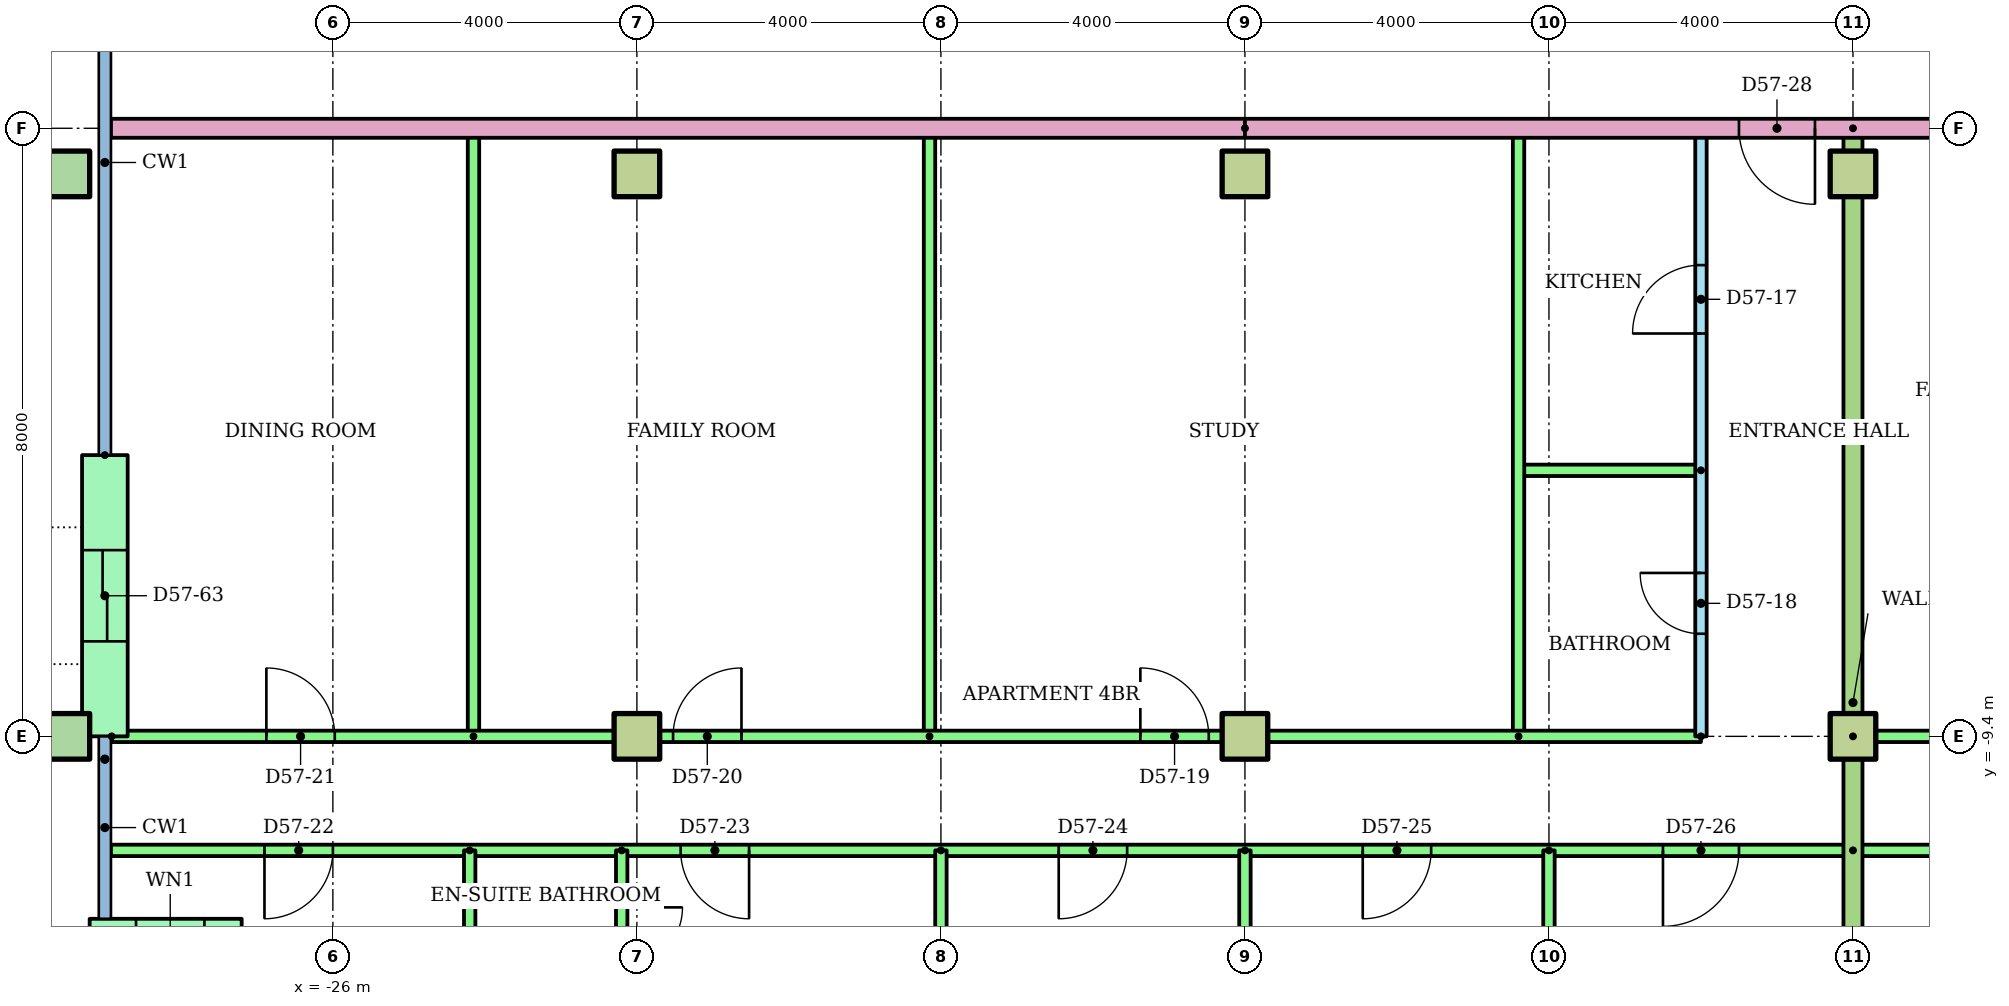
"""IFC4 building model, lengths in metres.
Left out: names, types, materials, properties, quantities, classifications, styles, units other than length and angle.
Written with IfcOpenShell. Run it as: python <this file> out.ifc"""

import sys

from ifc_helpers import new_model, si_unit, direction, frame, frame_2d, origin, origin_2d, place, context, subcontext, project, spatial, rectangle, hollow_rectangle, extrude, element, fill, save


model = new_model("IFC4")
c1 = context("Model", 3, precision=1e-05, world=origin(), true_north=direction((0.0, 1.0)))
c2 = subcontext(c1, "Body", "Model", "MODEL_VIEW")
j1 = project(units=[si_unit("LENGTHUNIT", "METRE"), si_unit("PLANEANGLEUNIT", "RADIAN")], contexts=[c1])
p1 = place(None, origin())
s1 = spatial("IfcSite", under=j1, at=p1, CompositionType="ELEMENT")
p2 = place(p1, origin())
s2 = spatial("IfcBuilding", under=s1, at=p2, CompositionType="ELEMENT")
p3 = place(p2, frame((0.0, 0.0, 220.4)))
s3 = spatial("IfcBuildingStorey", under=s2, at=p3, CompositionType="ELEMENT", Elevation=220.4)
p4 = place(p3, frame((-29.5, -9.4, 0.0)))
e1 = element("IfcColumn", 1, at=p4, inside=s3, PredefinedType="COLUMN", context=c2, shape_type="SweptSolid", body=[
    extrude(hollow_rectangle(XDim=0.6, YDim=0.6, WallThickness=0.03, at=origin_2d()), origin(), (0.0, 0.0, 1.0), 3.2),
])
for number, where in (
    (2, (-22.0, -9.4, 0.0)),
    (3, (-14.0, -9.4, 0.0)),
    (4, (-6.0, -9.4, 0.0)),
):
    element("IfcColumn", number, at=place(p3, frame(where)), inside=s3, PredefinedType="COLUMN", context=c2, shape_type="SweptSolid", body=[
        extrude(rectangle(XDim=0.6, YDim=0.6, at=origin_2d()), origin(), (0.0, 0.0, 1.0), 3.2),
    ])
p5 = place(p3, frame((-29.5, -2.0, 0.0)))
e5 = element("IfcColumn", 5, at=p5, inside=s3, PredefinedType="COLUMN", context=c2, shape_type="SweptSolid", body=[
    extrude(hollow_rectangle(XDim=0.6, YDim=0.6, WallThickness=0.03, at=origin_2d()), origin(), (0.0, 0.0, 1.0), 3.2),
])
for number, where in (
    (6, (-22.0, -2.0, 0.0)),
    (7, (-14.0, -2.0, 0.0)),
    (8, (-6.0, -2.0, 0.0)),
):
    element("IfcColumn", number, at=place(p3, frame(where)), inside=s3, PredefinedType="COLUMN", context=c2, shape_type="SweptSolid", body=[
        extrude(rectangle(XDim=0.6, YDim=0.6, at=origin_2d()), origin(), (0.0, 0.0, 1.0), 3.2),
    ])
p6 = place(p3, frame((-29.0, -5.7, 0.0), z_axis=(0.0, 0.0, 1.0), x_axis=(0.0, -1.0, 0.0)))
e9 = element("IfcWall", 9, at=p6, inside=s3, PredefinedType="STANDARD", context=c2, shape_type="SweptSolid", body=[
    extrude(rectangle(XDim=3.7, YDim=0.6, at=frame_2d((1.85, 0.0))), origin(), (0.0, 0.0, 1.0), 2.92),
])
p7 = place(p6, frame((1.25, 0.0, 0.0)))
e10 = element("IfcOpeningElement", 10, at=p7, cuts=e9, PredefinedType="OPENING", context=c2, shape_type="SweptSolid", body=[
    extrude(rectangle(XDim=1.2, YDim=2.1, at=frame_2d((0.6, 1.05))), frame((0.0, 0.31, 0.0), z_axis=(0.0, -1.0, 0.0), x_axis=(1.0, 0.0, 0.0)), (0.0, 0.0, 1.0), 0.62),
])
p8 = place(p3, frame((-29.2, -12.1, 0.0)))
e11 = element("IfcWall", 11, at=p8, inside=s3, PredefinedType="STANDARD", context=c2, shape_type="SweptSolid", body=[
    extrude(rectangle(XDim=2.0, YDim=0.6, at=frame_2d((1.0, 0.0))), origin(), (0.0, 0.0, 1.0), 2.92),
])
p9 = place(p8, frame((0.61, 0.0, 0.9)))
e12 = element("IfcOpeningElement", 12, at=p9, cuts=e11, PredefinedType="OPENING", context=c2, shape_type="SweptSolid", body=[
    extrude(rectangle(XDim=0.9, YDim=1.5, at=frame_2d((0.45, 0.75))), frame((0.0, 0.31, 0.0), z_axis=(0.0, -1.0, 0.0), x_axis=(1.0, 0.0, 0.0)), (0.0, 0.0, 1.0), 0.62),
])
p10 = place(p3, frame((-8.0, -9.4, 0.0), z_axis=(0.0, 0.0, 1.0), x_axis=(0.0, 1.0, 0.0)))
e13 = element("IfcWall", 13, at=p10, inside=s3, PredefinedType="PARTITIONING", context=c2, shape_type="SweptSolid", body=[
    extrude(rectangle(XDim=8.0, YDim=0.15, at=frame_2d((4.0, 0.0))), origin(), (0.0, 0.0, 1.0), 2.4),
])
p11 = place(p10, frame((5.3, 0.0, 0.0)))
e14 = element("IfcOpeningElement", 14, at=p11, cuts=e13, PredefinedType="OPENING", context=c2, shape_type="SweptSolid", body=[
    extrude(rectangle(XDim=0.9, YDim=2.1, at=frame_2d((0.45, 1.05))), frame((0.0, 0.085, 0.0), z_axis=(0.0, -1.0, 0.0), x_axis=(1.0, 0.0, 0.0)), (0.0, 0.0, 1.0), 0.17),
])
p12 = place(p10, frame((1.35, 0.0, 0.0)))
e15 = element("IfcOpeningElement", 15, at=p12, cuts=e13, PredefinedType="OPENING", context=c2, shape_type="SweptSolid", body=[
    extrude(rectangle(XDim=0.8, YDim=2.1, at=frame_2d((0.4, 1.05))), frame((0.0, 0.085, 0.0), z_axis=(0.0, -1.0, 0.0), x_axis=(1.0, 0.0, 0.0)), (0.0, 0.0, 1.0), 0.17),
])
p13 = place(p3, frame((-8.0, -5.9, 0.0), z_axis=(0.0, 0.0, 1.0), x_axis=(-1.0, 0.0, 0.0)))
e16 = element("IfcWall", 16, at=p13, inside=s3, PredefinedType="PARTITIONING", context=c2, shape_type="SweptSolid", body=[
    extrude(rectangle(XDim=2.4, YDim=0.15, at=frame_2d((1.2, 0.0))), origin(), (0.0, 0.0, 1.0), 2.4),
])
for number, where, z_axis, x_axis in (
    (17, (-10.4, -9.4, 0.0), (0.0, 0.0, 1.0), (0.0, 1.0, 0.0)),
    (18, (-18.15, -9.4, 0.0), (0.0, 0.0, 1.0), (0.0, 1.0, 0.0)),
    (19, (-24.15, -9.4, 0.0), (0.0, 0.0, 1.0), (0.0, 1.0, 0.0)),
):
    element("IfcWall", number, at=place(p3, frame(where, z_axis=z_axis, x_axis=x_axis)), inside=s3, PredefinedType="PARTITIONING", context=c2, shape_type="SweptSolid", body=[
        extrude(rectangle(XDim=8.0, YDim=0.15, at=frame_2d((4.0, 0.0))), origin(), (0.0, 0.0, 1.0), 2.4),
    ])
p14 = place(p3, frame((-28.91, -9.4, 0.0)))
e20 = element("IfcWall", 20, at=p14, inside=s3, PredefinedType="PARTITIONING", context=c2, shape_type="SweptSolid", body=[
    extrude(rectangle(XDim=20.91, YDim=0.15, at=frame_2d((10.455, 0.0))), origin(), (0.0, 0.0, 1.0), 2.4),
])
p15 = place(p14, frame((13.534, 0.0, 0.0)))
e21 = element("IfcOpeningElement", 21, at=p15, cuts=e20, PredefinedType="OPENING", context=c2, shape_type="SweptSolid", body=[
    extrude(rectangle(XDim=0.9, YDim=2.1, at=frame_2d((0.45, 1.05))), frame((0.0, 0.085, 0.0), z_axis=(0.0, -1.0, 0.0), x_axis=(1.0, 0.0, 0.0)), (0.0, 0.0, 1.0), 0.17),
])
p16 = place(p14, frame((7.386, 0.0, 0.0)))
e22 = element("IfcOpeningElement", 22, at=p16, cuts=e20, PredefinedType="OPENING", context=c2, shape_type="SweptSolid", body=[
    extrude(rectangle(XDim=0.9, YDim=2.1, at=frame_2d((0.45, 1.05))), frame((0.0, 0.085, 0.0), z_axis=(0.0, -1.0, 0.0), x_axis=(1.0, 0.0, 0.0)), (0.0, 0.0, 1.0), 0.17),
])
p17 = place(p14, frame((2.035, 0.0, 0.0)))
e23 = element("IfcOpeningElement", 23, at=p17, cuts=e20, PredefinedType="OPENING", context=c2, shape_type="SweptSolid", body=[
    extrude(rectangle(XDim=0.9, YDim=2.1, at=frame_2d((0.45, 1.05))), frame((0.0, 0.085, 0.0), z_axis=(0.0, -1.0, 0.0), x_axis=(1.0, 0.0, 0.0)), (0.0, 0.0, 1.0), 0.17),
])
p18 = place(p3, frame((-6.0, -10.9, 0.0), z_axis=(0.0, 0.0, 1.0), x_axis=(-1.0, 0.0, 0.0)))
e24 = element("IfcWall", 24, at=p18, inside=s3, PredefinedType="PARTITIONING", context=c2, shape_type="SweptSolid", body=[
    extrude(rectangle(XDim=22.92, YDim=0.15, at=frame_2d((11.46, 0.0))), origin(), (0.0, 0.0, 1.0), 2.4),
])
p19 = place(p18, frame((20.0, 0.0, 0.0)))
e25 = element("IfcOpeningElement", 25, at=p19, cuts=e24, PredefinedType="OPENING", context=c2, shape_type="SweptSolid", body=[
    extrude(rectangle(XDim=0.9, YDim=2.1, at=frame_2d((0.45, 1.05))), frame((0.0, 0.085, 0.0), z_axis=(0.0, -1.0, 0.0), x_axis=(1.0, 0.0, 0.0)), (0.0, 0.0, 1.0), 0.17),
])
p20 = place(p18, frame((14.524, 0.0, 0.0)))
e26 = element("IfcOpeningElement", 26, at=p20, cuts=e24, PredefinedType="OPENING", context=c2, shape_type="SweptSolid", body=[
    extrude(rectangle(XDim=0.9, YDim=2.1, at=frame_2d((0.45, 1.05))), frame((0.0, 0.085, 0.0), z_axis=(0.0, -1.0, 0.0), x_axis=(1.0, 0.0, 0.0)), (0.0, 0.0, 1.0), 0.17),
])
p21 = place(p18, frame((9.55, 0.0, 0.0)))
e27 = element("IfcOpeningElement", 27, at=p21, cuts=e24, PredefinedType="OPENING", context=c2, shape_type="SweptSolid", body=[
    extrude(rectangle(XDim=0.9, YDim=2.1, at=frame_2d((0.45, 1.05))), frame((0.0, 0.085, 0.0), z_axis=(0.0, -1.0, 0.0), x_axis=(1.0, 0.0, 0.0)), (0.0, 0.0, 1.0), 0.17),
])
p22 = place(p18, frame((5.55, 0.0, 0.0)))
e28 = element("IfcOpeningElement", 28, at=p22, cuts=e24, PredefinedType="OPENING", context=c2, shape_type="SweptSolid", body=[
    extrude(rectangle(XDim=0.9, YDim=2.1, at=frame_2d((0.45, 1.05))), frame((0.0, 0.085, 0.0), z_axis=(0.0, -1.0, 0.0), x_axis=(1.0, 0.0, 0.0)), (0.0, 0.0, 1.0), 0.17),
])
p23 = place(p18, frame((1.5, 0.0, 0.0)))
e29 = element("IfcOpeningElement", 29, at=p23, cuts=e24, PredefinedType="OPENING", context=c2, shape_type="SweptSolid", body=[
    extrude(rectangle(XDim=1.0, YDim=2.1, at=frame_2d((0.5, 1.05))), frame((0.0, 0.085, 0.0), z_axis=(0.0, -1.0, 0.0), x_axis=(1.0, 0.0, 0.0)), (0.0, 0.0, 1.0), 0.17),
])
p24 = place(p3, frame((-24.2, -10.9, 0.0), z_axis=(0.0, 0.0, 1.0), x_axis=(0.0, -1.0, 0.0)))
e30 = element("IfcWall", 30, at=p24, inside=s3, PredefinedType="PARTITIONING", context=c2, shape_type="SweptSolid", body=[
    extrude(rectangle(XDim=3.82, YDim=0.15, at=frame_2d((1.91, 0.0))), origin(), (0.0, 0.0, 1.0), 2.4),
])
p25 = place(p3, frame((-18.0, -10.9, 0.0), z_axis=(0.0, 0.0, 1.0), x_axis=(0.0, -1.0, 0.0)))
e31 = element("IfcWall", 31, at=p25, inside=s3, PredefinedType="PARTITIONING", context=c2, shape_type="SweptSolid", body=[
    extrude(rectangle(XDim=5.621, YDim=0.15, at=frame_2d((2.811, 0.0))), origin(), (0.0, 0.0, 1.0), 2.4),
])
p26 = place(p3, frame((-14.0, -10.9, 0.0), z_axis=(0.0, 0.0, 1.0), x_axis=(0.0, -1.0, 0.0)))
e32 = element("IfcWall", 32, at=p26, inside=s3, PredefinedType="PARTITIONING", context=c2, shape_type="SweptSolid", body=[
    extrude(rectangle(XDim=5.61, YDim=0.15, at=frame_2d((2.805, 0.0))), origin(), (0.0, 0.0, 1.0), 2.4),
])
p27 = place(p3, frame((-10.0, -10.9, 0.0), z_axis=(0.0, 0.0, 1.0), x_axis=(0.0, -1.0, 0.0)))
e33 = element("IfcWall", 33, at=p27, inside=s3, PredefinedType="PARTITIONING", context=c2, shape_type="SweptSolid", body=[
    extrude(rectangle(XDim=5.621, YDim=0.15, at=frame_2d((2.811, 0.0))), origin(), (0.0, 0.0, 1.0), 2.4),
])
p28 = place(p3, frame((-22.2, -10.9, 0.0), z_axis=(0.0, 0.0, 1.0), x_axis=(0.0, -1.0, 0.0)))
e34 = element("IfcWall", 34, at=p28, inside=s3, PredefinedType="PARTITIONING", context=c2, shape_type="SweptSolid", body=[
    extrude(rectangle(XDim=2.3, YDim=0.15, at=frame_2d((1.15, 0.0))), origin(), (0.0, 0.0, 1.0), 2.4),
])
p29 = place(p28, frame((0.75, 0.0, 0.0)))
e35 = element("IfcOpeningElement", 35, at=p29, cuts=e34, PredefinedType="OPENING", context=c2, shape_type="SweptSolid", body=[
    extrude(rectangle(XDim=0.8, YDim=2.1, at=frame_2d((0.4, 1.05))), frame((0.0, 0.085, 0.0), z_axis=(0.0, -1.0, 0.0), x_axis=(1.0, 0.0, 0.0)), (0.0, 0.0, 1.0), 0.17),
])
p30 = place(p3, frame((-6.0, -9.4, 0.0)))
e36 = element("IfcWall", 36, at=p30, inside=s3, PredefinedType="PARTITIONING", context=c2, shape_type="SweptSolid", body=[
    extrude(rectangle(XDim=6.0, YDim=0.15, at=frame_2d((3.0, 0.0))), origin(), (0.0, 0.0, 1.0), 2.4),
])
p31 = place(p30, frame((1.35, 0.0, 0.0)))
e37 = element("IfcOpeningElement", 37, at=p31, cuts=e36, PredefinedType="OPENING", context=c2, shape_type="SweptSolid", body=[
    extrude(rectangle(XDim=0.9, YDim=2.1, at=frame_2d((0.45, 1.05))), frame((0.0, 0.085, 0.0), z_axis=(0.0, -1.0, 0.0), x_axis=(1.0, 0.0, 0.0)), (0.0, 0.0, 1.0), 0.17),
])
p32 = place(p3, frame((2.0, -10.9, 0.0), z_axis=(0.0, 0.0, 1.0), x_axis=(-1.0, 0.0, 0.0)))
e38 = element("IfcWall", 38, at=p32, inside=s3, PredefinedType="PARTITIONING", context=c2, shape_type="SweptSolid", body=[
    extrude(rectangle(XDim=8.0, YDim=0.15, at=frame_2d((4.0, 0.0))), origin(), (0.0, 0.0, 1.0), 2.4),
])
p33 = place(p32, frame((5.55, 0.0, 0.0)))
e39 = element("IfcOpeningElement", 39, at=p33, cuts=e38, PredefinedType="OPENING", context=c2, shape_type="SweptSolid", body=[
    extrude(rectangle(XDim=0.9, YDim=2.1, at=frame_2d((0.45, 1.05))), frame((0.0, 0.085, 0.0), z_axis=(0.0, -1.0, 0.0), x_axis=(1.0, 0.0, 0.0)), (0.0, 0.0, 1.0), 0.17),
])
p34 = place(p32, frame((1.5, 0.0, 0.0)))
e40 = element("IfcOpeningElement", 40, at=p34, cuts=e38, PredefinedType="OPENING", context=c2, shape_type="SweptSolid", body=[
    extrude(rectangle(XDim=1.0, YDim=2.1, at=frame_2d((0.5, 1.05))), frame((0.0, 0.085, 0.0), z_axis=(0.0, -1.0, 0.0), x_axis=(1.0, 0.0, 0.0)), (0.0, 0.0, 1.0), 0.17),
])
p35 = place(p3, frame((-6.0, -1.4, 0.0), z_axis=(0.0, 0.0, 1.0), x_axis=(0.0, -1.0, 0.0)))
e41 = element("IfcWall", 41, at=p35, inside=s3, PredefinedType="PARTITIONING", context=c2, shape_type="SweptSolid", body=[
    extrude(rectangle(XDim=15.11, YDim=0.25, at=frame_2d((7.555, 0.0))), origin(), (0.0, 0.0, 1.0), 2.4),
])
p36 = place(p3, frame((-14.0, -1.4, 0.0), z_axis=(0.0, 0.0, 1.0), x_axis=(-1.0, 0.0, 0.0)))
e42 = element("IfcWall", 42, at=p36, inside=s3, PredefinedType="PARTITIONING", context=c2, shape_type="SweptSolid", body=[
    extrude(rectangle(XDim=14.92, YDim=0.25, at=frame_2d((7.46, 0.0))), origin(), (0.0, 0.0, 1.0), 2.4),
])
p37 = place(p3, frame((14.0, -1.4, 0.0), z_axis=(0.0, 0.0, 1.0), x_axis=(-1.0, 0.0, 0.0)))
e43 = element("IfcWall", 43, at=p37, inside=s3, PredefinedType="PARTITIONING", context=c2, shape_type="SweptSolid", body=[
    extrude(rectangle(XDim=28.0, YDim=0.25, at=frame_2d((14.0, 0.0))), origin(), (0.0, 0.0, 1.0), 2.4),
])
p38 = place(p37, frame((20.5, 0.0, 0.0)))
e44 = element("IfcOpeningElement", 44, at=p38, cuts=e43, PredefinedType="OPENING", context=c2, shape_type="SweptSolid", body=[
    extrude(rectangle(XDim=1.0, YDim=2.1, at=frame_2d((0.5, 1.05))), frame((0.0, 0.135, 0.0), z_axis=(0.0, -1.0, 0.0), x_axis=(1.0, 0.0, 0.0)), (0.0, 0.0, 1.0), 0.27),
])
p39 = place(p37, frame((12.5, 0.0, 0.0)))
e45 = element("IfcOpeningElement", 45, at=p39, cuts=e43, PredefinedType="OPENING", context=c2, shape_type="SweptSolid", body=[
    extrude(rectangle(XDim=1.0, YDim=2.1, at=frame_2d((0.5, 1.05))), frame((0.0, 0.135, 0.0), z_axis=(0.0, -1.0, 0.0), x_axis=(1.0, 0.0, 0.0)), (0.0, 0.0, 1.0), 0.27),
])
p40 = place(p37, frame((10.5, 0.0, 0.0)))
e46 = element("IfcOpeningElement", 46, at=p40, cuts=e43, PredefinedType="OPENING", context=c2, shape_type="SweptSolid", body=[
    extrude(rectangle(XDim=1.0, YDim=2.1, at=frame_2d((0.5, 1.05))), frame((0.0, 0.135, 0.0), z_axis=(0.0, -1.0, 0.0), x_axis=(1.0, 0.0, 0.0)), (0.0, 0.0, 1.0), 0.27),
])
p41 = place(p11, origin())
e47 = element("IfcDoor", 47, at=p41, inside=s3, OperationType="SINGLE_SWING_LEFT", PredefinedType="DOOR", context=c2, shape_type="SweptSolid", body=[
    extrude(rectangle(XDim=0.9, YDim=2.1, at=frame_2d((0.45, 1.05))), frame((0.0, 0.025, 0.0), z_axis=(0.0, -1.0, 0.0), x_axis=(1.0, 0.0, 0.0)), (0.0, 0.0, 1.0), 0.05),
])
fill(e14, e47)
p42 = place(p12, origin())
e48 = element("IfcDoor", 48, at=p42, inside=s3, OperationType="SINGLE_SWING_RIGHT", PredefinedType="DOOR", context=c2, shape_type="SweptSolid", body=[
    extrude(rectangle(XDim=0.8, YDim=2.1, at=frame_2d((0.4, 1.05))), frame((0.0, 0.025, 0.0), z_axis=(0.0, -1.0, 0.0), x_axis=(1.0, 0.0, 0.0)), (0.0, 0.0, 1.0), 0.05),
])
fill(e15, e48)
p43 = place(p15, origin())
e49 = element("IfcDoor", 49, at=p43, inside=s3, OperationType="SINGLE_SWING_LEFT", PredefinedType="DOOR", context=c2, shape_type="SweptSolid", body=[
    extrude(rectangle(XDim=0.9, YDim=2.1, at=frame_2d((0.45, 1.05))), frame((0.0, 0.025, 0.0), z_axis=(0.0, -1.0, 0.0), x_axis=(1.0, 0.0, 0.0)), (0.0, 0.0, 1.0), 0.05),
])
fill(e21, e49)
p44 = place(p16, origin())
e50 = element("IfcDoor", 50, at=p44, inside=s3, OperationType="SINGLE_SWING_RIGHT", PredefinedType="DOOR", context=c2, shape_type="SweptSolid", body=[
    extrude(rectangle(XDim=0.9, YDim=2.1, at=frame_2d((0.45, 1.05))), frame((0.0, 0.025, 0.0), z_axis=(0.0, -1.0, 0.0), x_axis=(1.0, 0.0, 0.0)), (0.0, 0.0, 1.0), 0.05),
])
fill(e22, e50)
p45 = place(p17, origin())
e51 = element("IfcDoor", 51, at=p45, inside=s3, OperationType="SINGLE_SWING_LEFT", PredefinedType="DOOR", context=c2, shape_type="SweptSolid", body=[
    extrude(rectangle(XDim=0.9, YDim=2.1, at=frame_2d((0.45, 1.05))), frame((0.0, 0.025, 0.0), z_axis=(0.0, -1.0, 0.0), x_axis=(1.0, 0.0, 0.0)), (0.0, 0.0, 1.0), 0.05),
])
fill(e23, e51)
p46 = place(p19, origin())
e52 = element("IfcDoor", 52, at=p46, inside=s3, OperationType="SINGLE_SWING_RIGHT", PredefinedType="DOOR", context=c2, shape_type="SweptSolid", body=[
    extrude(rectangle(XDim=0.9, YDim=2.1, at=frame_2d((0.45, 1.05))), frame((0.0, 0.025, 0.0), z_axis=(0.0, -1.0, 0.0), x_axis=(1.0, 0.0, 0.0)), (0.0, 0.0, 1.0), 0.05),
])
fill(e25, e52)
p47 = place(p20, origin())
e53 = element("IfcDoor", 53, at=p47, inside=s3, OperationType="SINGLE_SWING_LEFT", PredefinedType="DOOR", context=c2, shape_type="SweptSolid", body=[
    extrude(rectangle(XDim=0.9, YDim=2.1, at=frame_2d((0.45, 1.05))), frame((0.0, 0.025, 0.0), z_axis=(0.0, -1.0, 0.0), x_axis=(1.0, 0.0, 0.0)), (0.0, 0.0, 1.0), 0.05),
])
fill(e26, e53)
p48 = place(p21, origin())
e54 = element("IfcDoor", 54, at=p48, inside=s3, OperationType="SINGLE_SWING_RIGHT", PredefinedType="DOOR", context=c2, shape_type="SweptSolid", body=[
    extrude(rectangle(XDim=0.9, YDim=2.1, at=frame_2d((0.45, 1.05))), frame((0.0, 0.025, 0.0), z_axis=(0.0, -1.0, 0.0), x_axis=(1.0, 0.0, 0.0)), (0.0, 0.0, 1.0), 0.05),
])
fill(e27, e54)
p49 = place(p22, origin())
e55 = element("IfcDoor", 55, at=p49, inside=s3, OperationType="SINGLE_SWING_RIGHT", PredefinedType="DOOR", context=c2, shape_type="SweptSolid", body=[
    extrude(rectangle(XDim=0.9, YDim=2.1, at=frame_2d((0.45, 1.05))), frame((0.0, 0.025, 0.0), z_axis=(0.0, -1.0, 0.0), x_axis=(1.0, 0.0, 0.0)), (0.0, 0.0, 1.0), 0.05),
])
fill(e28, e55)
p50 = place(p23, origin())
e56 = element("IfcDoor", 56, at=p50, inside=s3, OperationType="SINGLE_SWING_RIGHT", PredefinedType="DOOR", context=c2, shape_type="SweptSolid", body=[
    extrude(rectangle(XDim=1.0, YDim=2.1, at=frame_2d((0.5, 1.05))), frame((0.0, 0.025, 0.0), z_axis=(0.0, -1.0, 0.0), x_axis=(1.0, 0.0, 0.0)), (0.0, 0.0, 1.0), 0.05),
])
fill(e29, e56)
p51 = place(p29, origin())
e57 = element("IfcDoor", 57, at=p51, inside=s3, OperationType="SINGLE_SWING_LEFT", PredefinedType="DOOR", context=c2, shape_type="SweptSolid", body=[
    extrude(rectangle(XDim=0.8, YDim=2.1, at=frame_2d((0.4, 1.05))), frame((0.0, 0.025, 0.0), z_axis=(0.0, -1.0, 0.0), x_axis=(1.0, 0.0, 0.0)), (0.0, 0.0, 1.0), 0.05),
])
fill(e35, e57)
p52 = place(p38, origin())
e58 = element("IfcDoor", 58, at=p52, inside=s3, OperationType="SINGLE_SWING_LEFT", PredefinedType="DOOR", context=c2, shape_type="SweptSolid", body=[
    extrude(rectangle(XDim=1.0, YDim=2.1, at=frame_2d((0.5, 1.05))), frame((0.0, 0.025, 0.0), z_axis=(0.0, -1.0, 0.0), x_axis=(1.0, 0.0, 0.0)), (0.0, 0.0, 1.0), 0.05),
])
fill(e44, e58)
p53 = place(p7, origin())
e59 = element("IfcDoor", 59, at=p53, inside=s3, OperationType="SLIDING_TO_LEFT", PredefinedType="DOOR", context=c2, shape_type="SweptSolid", body=[
    extrude(rectangle(XDim=1.2, YDim=2.1, at=frame_2d((0.6, 1.05))), frame((0.0, 0.025, 0.0), z_axis=(0.0, -1.0, 0.0), x_axis=(1.0, 0.0, 0.0)), (0.0, 0.0, 1.0), 0.05),
])
fill(e10, e59)
save(model, sys.argv[1])
